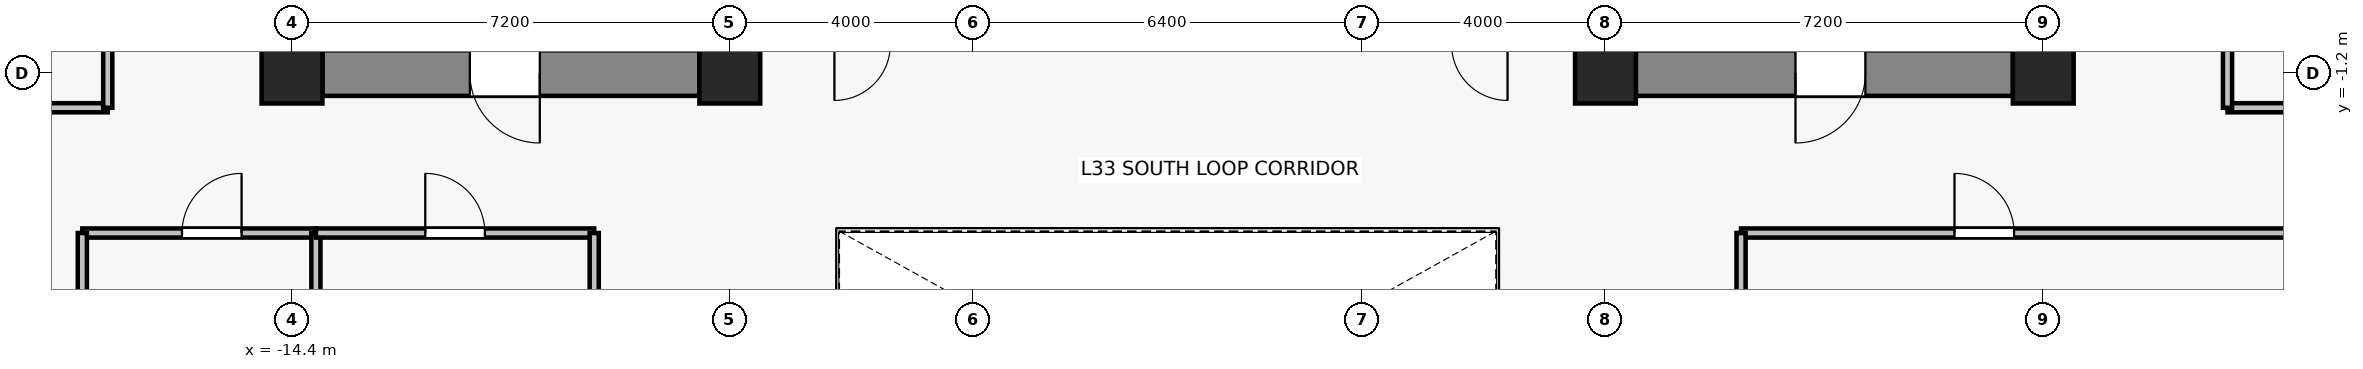
"""IFC4 building model, lengths in metres.
Left out: names, types, materials, properties, quantities, classifications, styles, units other than length and angle.
Written with IfcOpenShell. Run it as: python <this file> out.ifc"""

import sys

from ifc_helpers import new_model, si_unit, direction, frame, frame_2d, origin, origin_2d, place, context, subcontext, project, spatial, rectangle, extrude, source, transform, mapped, element, fill, save


model = new_model("IFC4")
c1 = context("Model", 3, precision=1e-05, world=origin(), true_north=direction((0.0, 1.0)))
c2 = subcontext(c1, "Body", "Model", "MODEL_VIEW")
j1 = project(units=[si_unit("LENGTHUNIT", "METRE"), si_unit("PLANEANGLEUNIT", "RADIAN")], contexts=[c1])
p1 = place(None, origin())
s1 = spatial("IfcSite", under=j1, at=p1, CompositionType="ELEMENT")
p2 = place(p1, origin())
s2 = spatial("IfcBuilding", under=s1, at=p2, CompositionType="ELEMENT")
p3 = place(p2, frame((0.0, 0.0, 119.8)))
s3 = spatial("IfcBuildingStorey", under=s2, at=p3, CompositionType="ELEMENT", Elevation=119.8)
for number, where, z_axis, x_axis in (
    (1, (-14.4, -1.2, 0.0), (0.0, 0.0, 1.0), (1.0, 0.0, 0.0)),
    (2, (-7.2, -1.2, 0.0), (0.0, 0.0, 1.0), (1.0, 0.0, 0.0)),
    (3, (7.2, -1.2, 0.0), (0.0, 0.0, 1.0), (1.0, 0.0, 0.0)),
    (4, (14.4, -1.2, 0.0), (0.0, 0.0, 1.0), (1.0, 0.0, 0.0)),
):
    element("IfcColumn", number, at=place(p3, frame(where, z_axis=z_axis, x_axis=x_axis)), inside=s3, PredefinedType="COLUMN", context=c2, shape_type="SweptSolid", body=[
        extrude(rectangle(XDim=1.0, YDim=1.0, at=origin_2d()), origin(), (0.0, 0.0, 1.0), 3.3),
    ])
p4 = place(p3, frame((-7.7, -1.2, 0.0), z_axis=(0.0, 0.0, 1.0), x_axis=(-1.0, 0.0, 0.0)))
e5 = element("IfcWall", 5, at=p4, inside=s3, PredefinedType="SHEAR", context=c2, shape_type="SweptSolid", body=[
    extrude(rectangle(XDim=6.2, YDim=0.75, at=frame_2d((3.1, 0.0))), origin(), (0.0, 0.0, 1.0), 3.075),
])
p5 = place(p4, frame((2.625, 0.0, 0.0)))
e6 = element("IfcOpeningElement", 6, at=p5, cuts=e5, PredefinedType="OPENING", context=c2, shape_type="SweptSolid", body=[
    extrude(rectangle(XDim=1.15, YDim=2.15, at=frame_2d((0.575, 1.075))), frame((0.0, 0.385, 0.0), z_axis=(0.0, -1.0, 0.0), x_axis=(1.0, 0.0, 0.0)), (0.0, 0.0, 1.0), 0.77),
])
p6 = place(p3, frame((13.9, -1.2, 0.0), z_axis=(0.0, 0.0, 1.0), x_axis=(-1.0, 0.0, 0.0)))
e7 = element("IfcWall", 7, at=p6, inside=s3, PredefinedType="SHEAR", context=c2, shape_type="SweptSolid", body=[
    extrude(rectangle(XDim=6.2, YDim=0.75, at=frame_2d((3.1, 0.0))), origin(), (0.0, 0.0, 1.0), 3.075),
])
p7 = place(p6, frame((2.425, 0.0, 0.0)))
e8 = element("IfcOpeningElement", 8, at=p7, cuts=e7, PredefinedType="OPENING", context=c2, shape_type="SweptSolid", body=[
    extrude(rectangle(XDim=1.15, YDim=2.15, at=frame_2d((0.575, 1.075))), frame((0.0, 0.385, 0.0), z_axis=(0.0, -1.0, 0.0), x_axis=(1.0, 0.0, 0.0)), (0.0, 0.0, 1.0), 0.77),
])
p8 = place(p3, frame((-17.848, -3.83, 0.0), z_axis=(0.0, 0.0, 1.0), x_axis=(1.0, 0.0, 0.0)))
e9 = element("IfcWall", 9, at=p8, inside=s3, PredefinedType="PARTITIONING", context=c2, shape_type="SweptSolid", body=[
    extrude(rectangle(XDim=3.841, YDim=0.15, at=frame_2d((1.92, 0.0))), origin(), (0.0, 0.0, 1.0), 2.515),
])
p9 = place(p8, frame((1.639, 0.0, 0.0)))
e10 = element("IfcOpeningElement", 10, at=p9, cuts=e9, PredefinedType="OPENING", context=c2, shape_type="SweptSolid", body=[
    extrude(rectangle(XDim=0.98, YDim=2.15, at=frame_2d((0.49, 1.075))), frame((0.0, 0.085, 0.0), z_axis=(0.0, -1.0, 0.0), x_axis=(1.0, 0.0, 0.0)), (0.0, 0.0, 1.0), 0.17),
])
p10 = place(p3, frame((-17.848, -12.52, 0.0), z_axis=(0.0, 0.0, 1.0), x_axis=(0.0, 1.0, 0.0)))
e11 = element("IfcWall", 11, at=p10, inside=s3, PredefinedType="PARTITIONING", context=c2, shape_type="SweptSolid", body=[
    extrude(rectangle(XDim=8.69, YDim=0.15, at=frame_2d((4.345, 0.0))), origin(), (0.0, 0.0, 1.0), 2.515),
])
p11 = place(p3, frame((-14.007, -3.83, 0.0), z_axis=(0.0, 0.0, 1.0), x_axis=(0.0, -1.0, 0.0)))
e12 = element("IfcWall", 12, at=p11, inside=s3, PredefinedType="PARTITIONING", context=c2, shape_type="SweptSolid", body=[
    extrude(rectangle(XDim=5.3, YDim=0.15, at=frame_2d((2.65, 0.0))), origin(), (0.0, 0.0, 1.0), 2.615),
])
p12 = place(p3, frame((-14.007, -3.83, 0.0), z_axis=(0.0, 0.0, 1.0), x_axis=(1.0, 0.0, 0.0)))
e13 = element("IfcWall", 13, at=p12, inside=s3, PredefinedType="PARTITIONING", context=c2, shape_type="SweptSolid", body=[
    extrude(rectangle(XDim=4.577, YDim=0.15, at=frame_2d((2.289, 0.0))), origin(), (0.0, 0.0, 1.0), 3.075),
])
p13 = place(p12, frame((1.799, 0.0, 0.0)))
e14 = element("IfcOpeningElement", 14, at=p13, cuts=e13, PredefinedType="OPENING", context=c2, shape_type="SweptSolid", body=[
    extrude(rectangle(XDim=0.98, YDim=2.15, at=frame_2d((0.49, 1.075))), frame((0.0, 0.085, 0.0), z_axis=(0.0, -1.0, 0.0), x_axis=(1.0, 0.0, 0.0)), (0.0, 0.0, 1.0), 0.17),
])
p14 = place(p3, frame((-9.43, -3.83, 0.0), z_axis=(0.0, 0.0, 1.0), x_axis=(0.0, -1.0, 0.0)))
e15 = element("IfcWall", 15, at=p14, inside=s3, PredefinedType="PARTITIONING", context=c2, shape_type="SweptSolid", body=[
    extrude(rectangle(XDim=8.69, YDim=0.15, at=frame_2d((4.345, 0.0))), origin(), (0.0, 0.0, 1.0), 2.515),
])
p15 = place(p3, frame((9.43, -3.83, 0.0), z_axis=(0.0, 0.0, 1.0), x_axis=(1.0, 0.0, 0.0)))
e16 = element("IfcWall", 16, at=p15, inside=s3, PredefinedType="PARTITIONING", context=c2, shape_type="SweptSolid", body=[
    extrude(rectangle(XDim=20.1, YDim=0.15, at=frame_2d((10.05, 0.0))), origin(), (0.0, 0.0, 1.0), 2.515),
])
p16 = place(p15, frame((3.51, 0.0, 0.0)))
e17 = element("IfcOpeningElement", 17, at=p16, cuts=e16, PredefinedType="OPENING", context=c2, shape_type="SweptSolid", body=[
    extrude(rectangle(XDim=0.98, YDim=2.15, at=frame_2d((0.49, 1.075))), frame((0.0, 0.085, 0.0), z_axis=(0.0, -1.0, 0.0), x_axis=(1.0, 0.0, 0.0)), (0.0, 0.0, 1.0), 0.17),
])
p17 = place(p3, frame((9.43, -12.52, 0.0), z_axis=(0.0, 0.0, 1.0), x_axis=(0.0, 1.0, 0.0)))
e18 = element("IfcWall", 18, at=p17, inside=s3, PredefinedType="PARTITIONING", context=c2, shape_type="SweptSolid", body=[
    extrude(rectangle(XDim=8.69, YDim=0.15, at=frame_2d((4.345, 0.0))), origin(), (0.0, 0.0, 1.0), 2.515),
])
p18 = place(p3, frame((-17.43, -1.77, 0.0), z_axis=(0.0, 0.0, 1.0), x_axis=(-1.0, 0.0, 0.0)))
e19 = element("IfcWall", 19, at=p18, inside=s3, PredefinedType="PARTITIONING", context=c2, shape_type="SweptSolid", body=[
    extrude(rectangle(XDim=8.1, YDim=0.15, at=frame_2d((4.05, 0.0))), origin(), (0.0, 0.0, 1.0), 2.515),
])
p19 = place(p3, frame((-17.43, 1.964, 0.0), z_axis=(0.0, 0.0, 1.0), x_axis=(0.0, -1.0, 0.0)))
e20 = element("IfcWall", 20, at=p19, inside=s3, PredefinedType="PARTITIONING", context=c2, shape_type="SweptSolid", body=[
    extrude(rectangle(XDim=3.734, YDim=0.15, at=frame_2d((1.867, 0.0))), origin(), (0.0, 0.0, 1.0), 2.515),
])
p20 = place(p19, frame((1.377, 0.0, 0.0)))
e21 = element("IfcOpeningElement", 21, at=p20, cuts=e20, PredefinedType="OPENING", context=c2, shape_type="SweptSolid", body=[
    extrude(rectangle(XDim=0.98, YDim=2.15, at=frame_2d((0.49, 1.075))), frame((0.0, 0.085, 0.0), z_axis=(0.0, -1.0, 0.0), x_axis=(1.0, 0.0, 0.0)), (0.0, 0.0, 1.0), 0.17),
])
p21 = place(p3, frame((29.53, -1.77, 0.0), z_axis=(0.0, 0.0, 1.0), x_axis=(-1.0, 0.0, 0.0)))
e22 = element("IfcWall", 22, at=p21, inside=s3, PredefinedType="PARTITIONING", context=c2, shape_type="SweptSolid", body=[
    extrude(rectangle(XDim=12.1, YDim=0.15, at=frame_2d((6.05, 0.0))), origin(), (0.0, 0.0, 1.0), 2.515),
])
p22 = place(p3, frame((17.43, -1.77, 0.0), z_axis=(0.0, 0.0, 1.0), x_axis=(0.0, 1.0, 0.0)))
e23 = element("IfcWall", 23, at=p22, inside=s3, PredefinedType="PARTITIONING", context=c2, shape_type="SweptSolid", body=[
    extrude(rectangle(XDim=6.292, YDim=0.15, at=frame_2d((3.146, 0.0))), origin(), (0.0, 0.0, 1.0), 2.515),
])
p23 = place(p22, frame((2.656, 0.0, 0.0)))
e24 = element("IfcOpeningElement", 24, at=p23, cuts=e23, PredefinedType="OPENING", context=c2, shape_type="SweptSolid", body=[
    extrude(rectangle(XDim=0.98, YDim=2.15, at=frame_2d((0.49, 1.075))), frame((0.0, 0.085, 0.0), z_axis=(0.0, -1.0, 0.0), x_axis=(1.0, 0.0, 0.0)), (0.0, 0.0, 1.0), 0.17),
])
m1 = source(origin(), c2, "Body", "SweptSolid", [
    extrude(rectangle(XDim=1.15, YDim=2.15, at=frame_2d((0.575, 1.075))), frame((0.0, 0.025, 0.0), z_axis=(0.0, -1.0, 0.0), x_axis=(1.0, 0.0, 0.0)), (0.0, 0.0, 1.0), 0.05),
])
p24 = place(p5, origin())
e25 = element("IfcDoor", 25, at=p24, inside=s3, OperationType="SINGLE_SWING_LEFT", PredefinedType="DOOR", context=c2, shape_type="MappedRepresentation", body=[
    mapped(m1, transform((0.0, 0.0, 0.0), x_axis=(1.0, 0.0, 0.0), y_axis=(0.0, 1.0, 0.0), z_axis=(0.0, 0.0, 1.0), scale=1.0)),
])
fill(e6, e25)
p25 = place(p7, origin())
e26 = element("IfcDoor", 26, at=p25, inside=s3, OperationType="SINGLE_SWING_RIGHT", PredefinedType="DOOR", context=c2, shape_type="MappedRepresentation", body=[
    mapped(m1, transform((0.0, 0.0, 0.0), x_axis=(1.0, 0.0, 0.0), y_axis=(0.0, 1.0, 0.0), z_axis=(0.0, 0.0, 1.0), scale=1.0)),
])
fill(e8, e26)
m2 = source(origin(), c2, "Body", "SweptSolid", [
    extrude(rectangle(XDim=0.98, YDim=2.15, at=frame_2d((0.49, 1.075))), frame((0.0, 0.025, 0.0), z_axis=(0.0, -1.0, 0.0), x_axis=(1.0, 0.0, 0.0)), (0.0, 0.0, 1.0), 0.05),
])
p26 = place(p9, origin())
e27 = element("IfcDoor", 27, at=p26, inside=s3, OperationType="SINGLE_SWING_RIGHT", PredefinedType="DOOR", context=c2, shape_type="MappedRepresentation", body=[
    mapped(m2, transform((0.0, 0.0, 0.0), x_axis=(1.0, 0.0, 0.0), y_axis=(0.0, 1.0, 0.0), z_axis=(0.0, 0.0, 1.0), scale=1.0)),
])
fill(e10, e27)
p27 = place(p13, origin())
e28 = element("IfcDoor", 28, at=p27, inside=s3, OperationType="SINGLE_SWING_LEFT", PredefinedType="DOOR", context=c2, shape_type="MappedRepresentation", body=[
    mapped(m2, transform((0.0, 0.0, 0.0), x_axis=(1.0, 0.0, 0.0), y_axis=(0.0, 1.0, 0.0), z_axis=(0.0, 0.0, 1.0), scale=1.0)),
])
fill(e14, e28)
p28 = place(p16, origin())
e29 = element("IfcDoor", 29, at=p28, inside=s3, OperationType="SINGLE_SWING_LEFT", PredefinedType="DOOR", context=c2, shape_type="MappedRepresentation", body=[
    mapped(m2, transform((0.0, 0.0, 0.0), x_axis=(1.0, 0.0, 0.0), y_axis=(0.0, 1.0, 0.0), z_axis=(0.0, 0.0, 1.0), scale=1.0)),
])
fill(e17, e29)
save(model, sys.argv[1])
